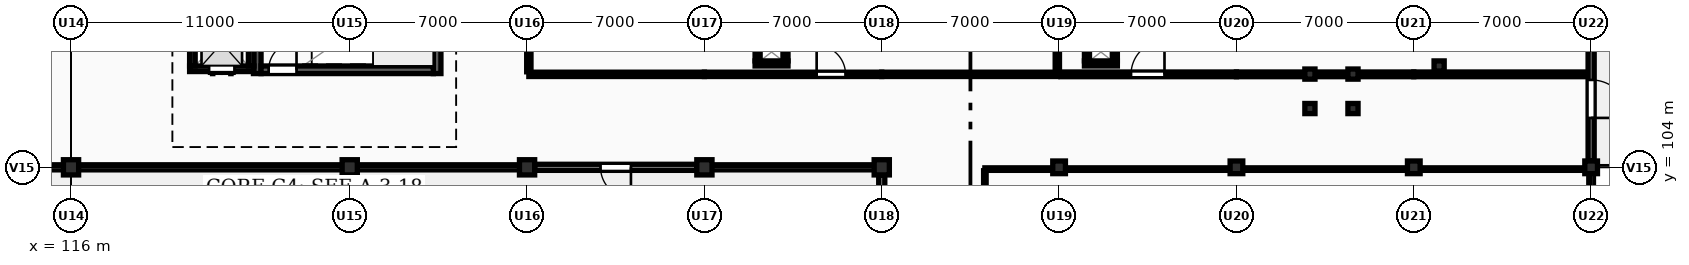
"""IFC4 building model, lengths in metres.
Left out: names, types, materials, properties, quantities, classifications, styles, units other than length and angle.
Written with IfcOpenShell. Run it as: python <this file> out.ifc"""

import sys

from ifc_helpers import new_model, si_unit, direction, frame, frame_2d, origin, origin_2d, place, context, subcontext, project, spatial, rectangle, extrude, element, fill, save


model = new_model("IFC4")
c1 = context("Model", 3, precision=1e-05, world=origin(), true_north=direction((0.0, 1.0)))
c2 = subcontext(c1, "Body", "Model", "MODEL_VIEW")
j1 = project(units=[si_unit("LENGTHUNIT", "METRE"), si_unit("PLANEANGLEUNIT", "RADIAN")], contexts=[c1])
p1 = place(None, origin())
s1 = spatial("IfcSite", under=j1, at=p1, CompositionType="ELEMENT")
p2 = place(p1, origin())
s2 = spatial("IfcBuilding", under=s1, at=p2, CompositionType="ELEMENT")
p3 = place(p2, frame((0.0, 0.0, 4.5)))
s3 = spatial("IfcBuildingStorey", under=s2, at=p3, CompositionType="ELEMENT", Elevation=4.5)
for number, where, z_axis, x_axis in (
    (1, (116.0, 104.0, 0.0), (0.0, 0.0, 1.0), (1.0, 0.0, 0.0)),
    (2, (127.0, 104.0, 0.0), (0.0, 0.0, 1.0), (1.0, 0.0, 0.0)),
    (3, (134.0, 104.0, 0.0), (0.0, 0.0, 1.0), (1.0, 0.0, 0.0)),
    (4, (141.0, 104.0, 0.0), (0.0, 0.0, 1.0), (1.0, 0.0, 0.0)),
    (5, (148.0, 104.0, 0.0), (0.0, 0.0, 1.0), (1.0, 0.0, 0.0)),
):
    element("IfcColumn", number, at=place(p3, frame(where, z_axis=z_axis, x_axis=x_axis)), inside=s3, PredefinedType="COLUMN", context=c2, shape_type="SweptSolid", body=[
        extrude(rectangle(XDim=0.6, YDim=0.6, at=origin_2d()), origin(), (0.0, 0.0, 1.0), 3.9),
    ])
for number, where, z_axis, x_axis in (
    (6, (155.0, 104.0, 0.0), (0.0, 0.0, 1.0), (1.0, 0.0, 0.0)),
    (7, (162.0, 104.0, 0.0), (0.0, 0.0, 1.0), (1.0, 0.0, 0.0)),
    (8, (169.0, 104.0, 0.0), (0.0, 0.0, 1.0), (1.0, 0.0, 0.0)),
    (9, (176.0, 104.0, 0.0), (0.0, 0.0, 1.0), (1.0, 0.0, 0.0)),
):
    element("IfcColumn", number, at=place(p3, frame(where, z_axis=z_axis, x_axis=x_axis)), inside=s3, PredefinedType="COLUMN", context=c2, shape_type="SweptSolid", body=[
        extrude(rectangle(XDim=0.5, YDim=0.5, at=origin_2d()), origin(), (0.0, 0.0, 1.0), 3.9),
    ])
p4 = place(p3, frame((170.0, 108.0, 0.0), z_axis=(0.0, 0.0, 1.0), x_axis=(1.0, 0.0, 0.0)))
e10 = element("IfcColumn", 10, at=p4, inside=s3, PredefinedType="COLUMN", context=c2, shape_type="SweptSolid", body=[
    extrude(rectangle(XDim=0.4, YDim=0.4, at=origin_2d()), origin(), (0.0, 0.0, 1.0), 3.9),
])
p5 = place(p3, frame((115.7, 104.0, 0.0), z_axis=(0.0, 0.0, 1.0), x_axis=(-1.0, 0.0, 0.0)))
e11 = element("IfcWall", 11, at=p5, inside=s3, PredefinedType="SOLIDWALL", context=c2, shape_type="SweptSolid", body=[
    extrude(rectangle(XDim=8.4, YDim=0.2, at=frame_2d((4.2, 0.0))), origin(), (0.0, 0.0, 1.0), 0.95),
])
p6 = place(p3, frame((176.0, 111.75, 0.0), z_axis=(0.0, 0.0, 1.0), x_axis=(0.0, -1.0, 0.0)))
e12 = element("IfcWall", 12, at=p6, inside=s3, PredefinedType="SOLIDWALL", context=c2, shape_type="SweptSolid", body=[
    extrude(rectangle(XDim=7.5, YDim=0.24, at=frame_2d((3.75, 0.0))), origin(), (0.0, 0.0, 1.0), 2.948),
])
p7 = place(p6, frame((4.3, 0.0, 0.0)))
e13 = element("IfcOpeningElement", 13, at=p7, cuts=e12, PredefinedType="OPENING", context=c2, shape_type="SweptSolid", body=[
    extrude(rectangle(XDim=1.5, YDim=2.15, at=frame_2d((0.75, 1.075))), frame((0.0, 0.13, 0.0), z_axis=(0.0, -1.0, 0.0), x_axis=(1.0, 0.0, 0.0)), (0.0, 0.0, 1.0), 0.26),
])
p8 = place(p3, frame((147.7, 104.0, 0.0), z_axis=(0.0, 0.0, 1.0), x_axis=(-1.0, 0.0, 0.0)))
e14 = element("IfcWall", 14, at=p8, inside=s3, PredefinedType="SOLIDWALL", context=c2, shape_type="SweptSolid", body=[
    extrude(rectangle(XDim=6.4, YDim=0.2, at=frame_2d((3.2, 0.0))), origin(), (0.0, 0.0, 1.0), 0.95),
])
p9 = place(p3, frame((140.7, 104.0, 0.0), z_axis=(0.0, 0.0, 1.0), x_axis=(-1.0, 0.0, 0.0)))
e15 = element("IfcWall", 15, at=p9, inside=s3, PredefinedType="SOLIDWALL", context=c2, shape_type="SweptSolid", body=[
    extrude(rectangle(XDim=6.4, YDim=0.24, at=frame_2d((3.2, 0.0))), origin(), (0.0, 0.0, 1.0), 2.995),
])
p10 = place(p9, frame((2.6, 0.0, 0.0)))
e16 = element("IfcOpeningElement", 16, at=p10, cuts=e15, PredefinedType="OPENING", context=c2, shape_type="SweptSolid", body=[
    extrude(rectangle(XDim=1.2, YDim=2.15, at=frame_2d((0.6, 1.075))), frame((0.0, 0.13, 0.0), z_axis=(0.0, -1.0, 0.0), x_axis=(1.0, 0.0, 0.0)), (0.0, 0.0, 1.0), 0.26),
])
p11 = place(p3, frame((133.7, 104.0, 0.0), z_axis=(0.0, 0.0, 1.0), x_axis=(-1.0, 0.0, 0.0)))
e17 = element("IfcWall", 17, at=p11, inside=s3, PredefinedType="SOLIDWALL", context=c2, shape_type="SweptSolid", body=[
    extrude(rectangle(XDim=6.4, YDim=0.2, at=frame_2d((3.2, 0.0))), origin(), (0.0, 0.0, 1.0), 0.95),
])
p12 = place(p3, frame((126.7, 104.0, 0.0), z_axis=(0.0, 0.0, 1.0), x_axis=(-1.0, 0.0, 0.0)))
e18 = element("IfcWall", 18, at=p12, inside=s3, PredefinedType="SOLIDWALL", context=c2, shape_type="SweptSolid", body=[
    extrude(rectangle(XDim=10.4, YDim=0.2, at=frame_2d((5.2, 0.0))), origin(), (0.0, 0.0, 1.0), 0.95),
])
p13 = place(p3, frame((176.0, 103.75, 0.0), z_axis=(0.0, 0.0, 1.0), x_axis=(0.0, -1.0, 0.0)))
e19 = element("IfcWall", 19, at=p13, inside=s3, PredefinedType="SOLIDWALL", context=c2, shape_type="SweptSolid", body=[
    extrude(rectangle(XDim=7.5, YDim=0.185, at=frame_2d((3.75, 0.0))), origin(), (0.0, 0.0, 1.0), 0.95),
])
p14 = place(p3, frame((148.0, 96.25, 0.0), z_axis=(0.0, 0.0, 1.0), x_axis=(0.0, 1.0, 0.0)))
e20 = element("IfcWall", 20, at=p14, inside=s3, PredefinedType="SOLIDWALL", context=c2, shape_type="SweptSolid", body=[
    extrude(rectangle(XDim=7.45, YDim=0.24, at=frame_2d((3.725, 0.0))), origin(), (0.0, 0.0, 1.0), 3.0),
])
p15 = place(p14, frame((2.475, 0.0, 0.95)))
e21 = element("IfcOpeningElement", 21, at=p15, cuts=e20, PredefinedType="OPENING", context=c2, shape_type="SweptSolid", body=[
    extrude(rectangle(XDim=2.5, YDim=1.65, at=frame_2d((1.25, 0.825))), frame((0.0, 0.13, 0.0), z_axis=(0.0, -1.0, 0.0), x_axis=(1.0, 0.0, 0.0)), (0.0, 0.0, 1.0), 0.26),
])
for number, where, z_axis, x_axis in (
    (22, (123.35, 107.7, 0.0), (0.0, 0.0, 1.0), (0.0, 1.0, 0.0)),
    (23, (130.45, 111.8, 0.0), (0.0, 0.0, 1.0), (0.0, -1.0, 0.0)),
):
    element("IfcWall", number, at=place(p3, frame(where, z_axis=z_axis, x_axis=x_axis)), inside=s3, PredefinedType="SHEAR", context=c2, shape_type="SweptSolid", body=[
        extrude(rectangle(XDim=4.1, YDim=0.3, at=frame_2d((2.05, 0.0))), origin(), (0.0, 0.0, 1.0), 3.65),
    ])
p16 = place(p3, frame((123.5, 107.85, 0.0), z_axis=(0.0, 0.0, 1.0), x_axis=(1.0, 0.0, 0.0)))
e24 = element("IfcWall", 24, at=p16, inside=s3, PredefinedType="SHEAR", context=c2, shape_type="SweptSolid", body=[
    extrude(rectangle(XDim=6.8, YDim=0.3, at=frame_2d((3.4, 0.0))), origin(), (0.0, 0.0, 1.0), 3.65),
])
p17 = place(p16, frame((0.3, 0.0, 0.0)))
e25 = element("IfcOpeningElement", 25, at=p17, cuts=e24, PredefinedType="OPENING", context=c2, shape_type="SweptSolid", body=[
    extrude(rectangle(XDim=1.1, YDim=2.15, at=frame_2d((0.55, 1.075))), frame((0.0, 0.16, 0.0), z_axis=(0.0, -1.0, 0.0), x_axis=(1.0, 0.0, 0.0)), (0.0, 0.0, 1.0), 0.32),
])
p18 = place(p3, frame((123.22, 107.89, 0.0), z_axis=(0.0, 0.0, 1.0), x_axis=(-1.0, 0.0, 0.0)))
e26 = element("IfcWall", 26, at=p18, inside=s3, PredefinedType="SHEAR", context=c2, shape_type="SweptSolid", body=[
    extrude(rectangle(XDim=2.54, YDim=0.22, at=frame_2d((1.27, 0.0))), origin(), (0.0, 0.0, 1.0), 3.65),
])
p19 = place(p18, frame((0.77, 0.0, 0.0)))
e27 = element("IfcOpeningElement", 27, at=p19, cuts=e26, PredefinedType="OPENING", context=c2, shape_type="SweptSolid", body=[
    extrude(rectangle(XDim=1.0, YDim=2.15, at=frame_2d((0.5, 1.075))), frame((0.0, 0.12, 0.0), z_axis=(0.0, -1.0, 0.0), x_axis=(1.0, 0.0, 0.0)), (0.0, 0.0, 1.0), 0.24),
])
for number, where, z_axis, x_axis in (
    (28, (120.79, 108.0, 0.0), (0.0, 0.0, 1.0), (0.0, 1.0, 0.0)),
    (29, (123.11, 110.3, 0.0), (0.0, 0.0, 1.0), (0.0, -1.0, 0.0)),
):
    element("IfcWall", number, at=place(p3, frame(where, z_axis=z_axis, x_axis=x_axis)), inside=s3, PredefinedType="SHEAR", context=c2, shape_type="SweptSolid", body=[
        extrude(rectangle(XDim=2.3, YDim=0.22, at=frame_2d((1.15, 0.0))), origin(), (0.0, 0.0, 1.0), 3.65),
    ])
p20 = place(p3, frame((144.3, 108.1, 0.0), z_axis=(0.0, 0.0, 1.0), x_axis=(-1.0, 0.0, 0.0)))
e30 = element("IfcWall", 30, at=p20, inside=s3, PredefinedType="PARTITIONING", context=c2, shape_type="SweptSolid", body=[
    extrude(rectangle(XDim=1.3, YDim=0.2, at=frame_2d((0.65, 0.0))), origin(), (0.0, 0.0, 1.0), 3.65),
])
p21 = place(p3, frame((143.1, 108.2, 0.0), z_axis=(0.0, 0.0, 1.0), x_axis=(0.0, 1.0, 0.0)))
e31 = element("IfcWall", 31, at=p21, inside=s3, PredefinedType="PARTITIONING", context=c2, shape_type="SweptSolid", body=[
    extrude(rectangle(XDim=0.7, YDim=0.2, at=frame_2d((0.35, 0.0))), origin(), (0.0, 0.0, 1.0), 3.245),
])
p22 = place(p3, frame((144.2, 108.9, 0.0), z_axis=(0.0, 0.0, 1.0), x_axis=(0.0, -1.0, 0.0)))
e32 = element("IfcWall", 32, at=p22, inside=s3, PredefinedType="PARTITIONING", context=c2, shape_type="SweptSolid", body=[
    extrude(rectangle(XDim=0.7, YDim=0.2, at=frame_2d((0.35, 0.0))), origin(), (0.0, 0.0, 1.0), 3.65),
])
p23 = place(p3, frame((157.3, 108.1, 0.0), z_axis=(0.0, 0.0, 1.0), x_axis=(-1.0, 0.0, 0.0)))
e33 = element("IfcWall", 33, at=p23, inside=s3, PredefinedType="PARTITIONING", context=c2, shape_type="SweptSolid", body=[
    extrude(rectangle(XDim=1.3, YDim=0.2, at=frame_2d((0.65, 0.0))), origin(), (0.0, 0.0, 1.0), 3.65),
])
p24 = place(p3, frame((156.1, 108.2, 0.0), z_axis=(0.0, 0.0, 1.0), x_axis=(0.0, 1.0, 0.0)))
e34 = element("IfcWall", 34, at=p24, inside=s3, PredefinedType="PARTITIONING", context=c2, shape_type="SweptSolid", body=[
    extrude(rectangle(XDim=0.7, YDim=0.2, at=frame_2d((0.35, 0.0))), origin(), (0.0, 0.0, 1.0), 3.65),
])
p25 = place(p3, frame((157.2, 108.9, 0.0), z_axis=(0.0, 0.0, 1.0), x_axis=(0.0, -1.0, 0.0)))
e35 = element("IfcWall", 35, at=p25, inside=s3, PredefinedType="PARTITIONING", context=c2, shape_type="SweptSolid", body=[
    extrude(rectangle(XDim=0.7, YDim=0.2, at=frame_2d((0.35, 0.0))), origin(), (0.0, 0.0, 1.0), 3.245),
])
for number, where, z_axis, x_axis in (
    (36, (166.6, 107.68, 0.0), (0.0, 0.0, 1.0), (1.0, 0.0, 0.0)),
    (37, (164.9, 107.68, 0.0), (0.0, 0.0, 1.0), (1.0, 0.0, 0.0)),
    (38, (164.9, 106.32, 0.0), (0.0, 0.0, 1.0), (1.0, 0.0, 0.0)),
    (39, (166.6, 106.32, 0.0), (0.0, 0.0, 1.0), (1.0, 0.0, 0.0)),
):
    element("IfcColumn", number, at=place(p3, frame(where, z_axis=z_axis, x_axis=x_axis)), inside=s3, PredefinedType="COLUMN", context=c2, shape_type="SweptSolid", body=[
        extrude(rectangle(XDim=0.4, YDim=0.4, at=origin_2d()), origin(), (0.0, 0.0, 1.0), 3.9),
    ])
p26 = place(p3, frame((134.07, 107.67, 0.0), z_axis=(0.0, 0.0, 1.0), x_axis=(1.0, 0.0, 0.0)))
e40 = element("IfcWall", 40, at=p26, inside=s3, PredefinedType="PARTITIONING", context=c2, shape_type="SweptSolid", body=[
    extrude(rectangle(XDim=6.93, YDim=0.17, at=frame_2d((3.465, 0.0))), origin(), (0.0, 0.0, 1.0), 3.65),
])
p27 = place(p3, frame((141.0, 107.67, 0.0), z_axis=(0.0, 0.0, 1.0), x_axis=(1.0, 0.0, 0.0)))
e41 = element("IfcWall", 41, at=p27, inside=s3, PredefinedType="PARTITIONING", context=c2, shape_type="SweptSolid", body=[
    extrude(rectangle(XDim=7.0, YDim=0.17, at=frame_2d((3.5, 0.0))), origin(), (0.0, 0.0, 1.0), 3.65),
])
p28 = place(p27, frame((4.43, 0.0, 0.0)))
e42 = element("IfcOpeningElement", 42, at=p28, cuts=e41, PredefinedType="OPENING", context=c2, shape_type="SweptSolid", body=[
    extrude(rectangle(XDim=1.14, YDim=2.2, at=frame_2d((0.57, 1.1))), frame((0.0, 0.095, 0.0), z_axis=(0.0, -1.0, 0.0), x_axis=(1.0, 0.0, 0.0)), (0.0, 0.0, 1.0), 0.19),
])
p29 = place(p3, frame((148.0, 107.67, 0.0), z_axis=(0.0, 0.0, 1.0), x_axis=(1.0, 0.0, 0.0)))
e43 = element("IfcWall", 43, at=p29, inside=s3, PredefinedType="PARTITIONING", context=c2, shape_type="SweptSolid", body=[
    extrude(rectangle(XDim=6.93, YDim=0.17, at=frame_2d((3.465, 0.0))), origin(), (0.0, 0.0, 1.0), 3.65),
])
p30 = place(p3, frame((134.07, 107.77, 0.0), z_axis=(0.0, 0.0, 1.0), x_axis=(0.0, 1.0, 0.0)))
e44 = element("IfcWall", 44, at=p30, inside=s3, PredefinedType="PARTITIONING", context=c2, shape_type="SweptSolid", body=[
    extrude(rectangle(XDim=3.915, YDim=0.17, at=frame_2d((1.958, 0.0))), origin(), (0.0, 0.0, 1.0), 2.995),
])
p31 = place(p3, frame((154.93, 107.77, 0.0), z_axis=(0.0, 0.0, 1.0), x_axis=(0.0, 1.0, 0.0)))
e45 = element("IfcWall", 45, at=p31, inside=s3, PredefinedType="PARTITIONING", context=c2, shape_type="SweptSolid", body=[
    extrude(rectangle(XDim=3.965, YDim=0.17, at=frame_2d((1.982, 0.0))), origin(), (0.0, 0.0, 1.0), 2.995),
])
p32 = place(p3, frame((155.07, 107.67, 0.0), z_axis=(0.0, 0.0, 1.0), x_axis=(1.0, 0.0, 0.0)))
e46 = element("IfcWall", 46, at=p32, inside=s3, PredefinedType="PARTITIONING", context=c2, shape_type="SweptSolid", body=[
    extrude(rectangle(XDim=6.93, YDim=0.185, at=frame_2d((3.465, 0.0))), origin(), (0.0, 0.0, 1.0), 3.65),
])
p33 = place(p32, frame((2.77, 0.0, 0.0)))
e47 = element("IfcOpeningElement", 47, at=p33, cuts=e46, PredefinedType="OPENING", context=c2, shape_type="SweptSolid", body=[
    extrude(rectangle(XDim=1.32, YDim=2.2, at=frame_2d((0.66, 1.1))), frame((0.0, 0.103, 0.0), z_axis=(0.0, -1.0, 0.0), x_axis=(1.0, 0.0, 0.0)), (0.0, 0.0, 1.0), 0.205),
])
p34 = place(p3, frame((162.0, 107.67, 0.0), z_axis=(0.0, 0.0, 1.0), x_axis=(1.0, 0.0, 0.0)))
e48 = element("IfcWall", 48, at=p34, inside=s3, PredefinedType="PARTITIONING", context=c2, shape_type="SweptSolid", body=[
    extrude(rectangle(XDim=7.0, YDim=0.185, at=frame_2d((3.5, 0.0))), origin(), (0.0, 0.0, 1.0), 3.65),
])
p35 = place(p3, frame((169.0, 107.67, 0.0), z_axis=(0.0, 0.0, 1.0), x_axis=(1.0, 0.0, 0.0)))
e49 = element("IfcWall", 49, at=p35, inside=s3, PredefinedType="PARTITIONING", context=c2, shape_type="SweptSolid", body=[
    extrude(rectangle(XDim=6.838, YDim=0.185, at=frame_2d((3.419, 0.0))), origin(), (0.0, 0.0, 1.0), 3.65),
])
p36 = place(p3, frame((152.07, 103.93, 0.0), z_axis=(0.0, 0.0, 1.0), x_axis=(1.0, 0.0, 0.0)))
e50 = element("IfcWall", 50, at=p36, inside=s3, PredefinedType="PARTITIONING", context=c2, shape_type="SweptSolid", body=[
    extrude(rectangle(XDim=2.665, YDim=0.1, at=frame_2d((1.333, 0.0))), origin(), (0.0, 0.0, 1.0), 2.995),
])
for number, where, z_axis, x_axis in (
    (51, (155.265, 103.93, 0.0), (0.0, 0.0, 1.0), (1.0, 0.0, 0.0)),
    (52, (162.265, 103.93, 0.0), (0.0, 0.0, 1.0), (1.0, 0.0, 0.0)),
):
    element("IfcWall", number, at=place(p3, frame(where, z_axis=z_axis, x_axis=x_axis)), inside=s3, PredefinedType="PARTITIONING", context=c2, shape_type="SweptSolid", body=[
        extrude(rectangle(XDim=6.47, YDim=0.1, at=frame_2d((3.235, 0.0))), origin(), (0.0, 0.0, 1.0), 2.995),
    ])
p37 = place(p3, frame((169.265, 103.93, 0.0), z_axis=(0.0, 0.0, 1.0), x_axis=(1.0, 0.0, 0.0)))
e53 = element("IfcWall", 53, at=p37, inside=s3, PredefinedType="PARTITIONING", context=c2, shape_type="SweptSolid", body=[
    extrude(rectangle(XDim=6.465, YDim=0.1, at=frame_2d((3.232, 0.0))), origin(), (0.0, 0.0, 1.0), 2.998),
])
p38 = place(p3, frame((152.07, 92.135, 0.0), z_axis=(0.0, 0.0, 1.0), x_axis=(0.0, 1.0, 0.0)))
e54 = element("IfcWall", 54, at=p38, inside=s3, PredefinedType="PARTITIONING", context=c2, shape_type="SweptSolid", body=[
    extrude(rectangle(XDim=11.73, YDim=0.1, at=frame_2d((5.865, 0.0))), origin(), (0.0, 0.0, 1.0), 3.65),
])
p39 = place(p38, frame((5.405, 0.0, 0.0)))
e55 = element("IfcOpeningElement", 55, at=p39, cuts=e54, PredefinedType="OPENING", context=c2, shape_type="SweptSolid", body=[
    extrude(rectangle(XDim=0.92, YDim=2.1, at=frame_2d((0.46, 1.05))), frame((0.0, 0.06, 0.0), z_axis=(0.0, -1.0, 0.0), x_axis=(1.0, 0.0, 0.0)), (0.0, 0.0, 1.0), 0.12),
])
p40 = place(p7, origin())
e56 = element("IfcDoor", 56, at=p40, inside=s3, OperationType="SINGLE_SWING_RIGHT", PredefinedType="DOOR", context=c2, shape_type="SweptSolid", body=[
    extrude(rectangle(XDim=1.5, YDim=2.15, at=frame_2d((0.75, 1.075))), frame((0.0, 0.025, 0.0), z_axis=(0.0, -1.0, 0.0), x_axis=(1.0, 0.0, 0.0)), (0.0, 0.0, 1.0), 0.05),
])
fill(e13, e56)
p41 = place(p10, origin())
e57 = element("IfcDoor", 57, at=p41, inside=s3, OperationType="SINGLE_SWING_LEFT", PredefinedType="DOOR", context=c2, shape_type="SweptSolid", body=[
    extrude(rectangle(XDim=1.2, YDim=2.15, at=frame_2d((0.6, 1.075))), frame((0.0, 0.025, 0.0), z_axis=(0.0, -1.0, 0.0), x_axis=(1.0, 0.0, 0.0)), (0.0, 0.0, 1.0), 0.05),
])
fill(e16, e57)
p42 = place(p17, origin())
e58 = element("IfcDoor", 58, at=p42, inside=s3, OperationType="SINGLE_SWING_RIGHT", PredefinedType="DOOR", context=c2, shape_type="SweptSolid", body=[
    extrude(rectangle(XDim=1.1, YDim=2.15, at=frame_2d((0.55, 1.075))), frame((0.0, 0.025, 0.0), z_axis=(0.0, -1.0, 0.0), x_axis=(1.0, 0.0, 0.0)), (0.0, 0.0, 1.0), 0.05),
])
fill(e25, e58)
p43 = place(p19, origin())
e59 = element("IfcDoor", 59, at=p43, inside=s3, OperationType="DOUBLE_DOOR_SLIDING", PredefinedType="DOOR", context=c2, shape_type="SweptSolid", body=[
    extrude(rectangle(XDim=1.0, YDim=2.15, at=frame_2d((0.5, 1.075))), frame((0.0, 0.025, 0.0), z_axis=(0.0, -1.0, 0.0), x_axis=(1.0, 0.0, 0.0)), (0.0, 0.0, 1.0), 0.05),
])
fill(e27, e59)
p44 = place(p28, origin())
e60 = element("IfcDoor", 60, at=p44, inside=s3, OperationType="SINGLE_SWING_LEFT", PredefinedType="DOOR", context=c2, shape_type="SweptSolid", body=[
    extrude(rectangle(XDim=1.14, YDim=2.2, at=frame_2d((0.57, 1.1))), frame((0.0, 0.025, 0.0), z_axis=(0.0, -1.0, 0.0), x_axis=(1.0, 0.0, 0.0)), (0.0, 0.0, 1.0), 0.05),
])
fill(e42, e60)
p45 = place(p33, origin())
e61 = element("IfcDoor", 61, at=p45, inside=s3, OperationType="SINGLE_SWING_RIGHT", PredefinedType="DOOR", context=c2, shape_type="SweptSolid", body=[
    extrude(rectangle(XDim=1.32, YDim=2.2, at=frame_2d((0.66, 1.1))), frame((0.0, 0.025, 0.0), z_axis=(0.0, -1.0, 0.0), x_axis=(1.0, 0.0, 0.0)), (0.0, 0.0, 1.0), 0.05),
])
fill(e47, e61)
save(model, sys.argv[1])
